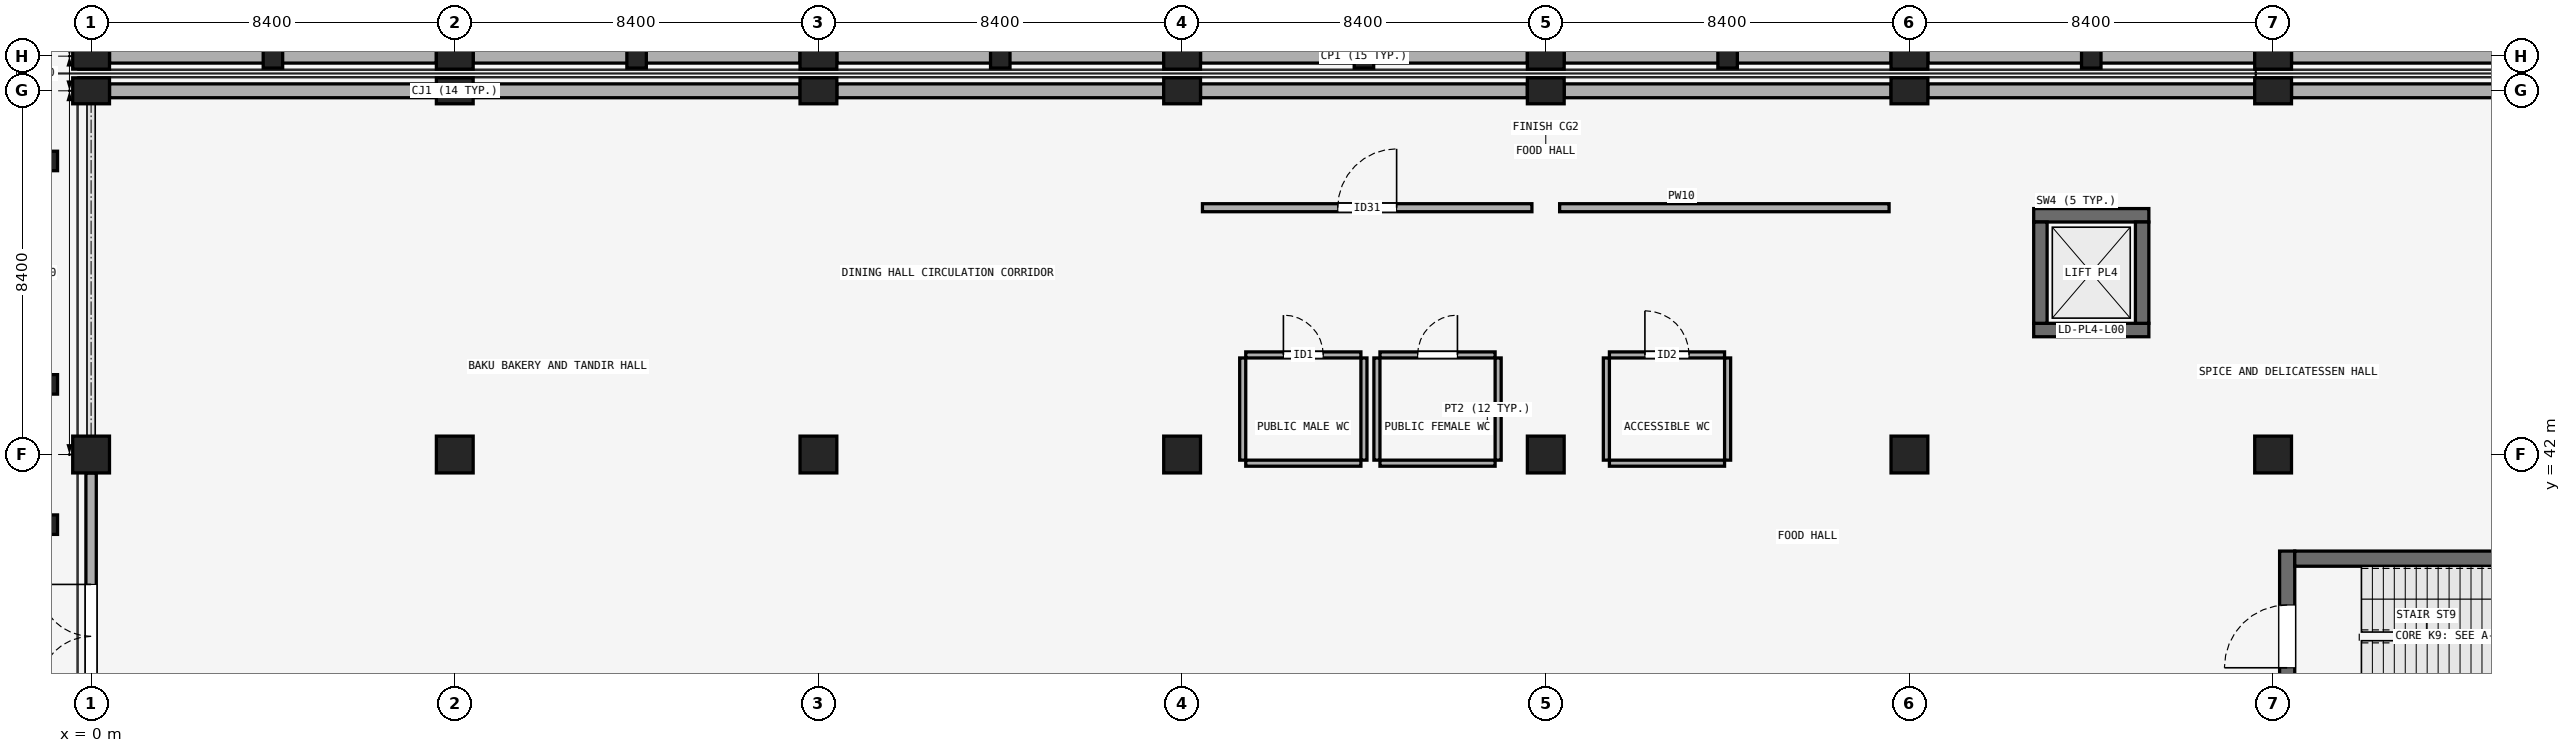
"""IFC4 building model, lengths in metres.
Left out: names, types, materials, properties, quantities, classifications, styles, units other than length and angle.
Written with IfcOpenShell. Run it as: python <this file> out.ifc"""

import sys

from ifc_helpers import new_model, si_unit, direction, frame, frame_2d, origin, origin_2d, place, context, subcontext, project, spatial, rectangle, extrude, element, fill, save


model = new_model("IFC4")
c1 = context("Model", 3, precision=1e-05, world=origin(), true_north=direction((0.0, 1.0)))
c2 = subcontext(c1, "Body", "Model", "MODEL_VIEW")
j1 = project(units=[si_unit("LENGTHUNIT", "METRE"), si_unit("PLANEANGLEUNIT", "RADIAN")], contexts=[c1])
p1 = place(None, origin())
s1 = spatial("IfcSite", under=j1, at=p1, CompositionType="ELEMENT")
p2 = place(p1, origin())
s2 = spatial("IfcBuilding", under=s1, at=p2, CompositionType="ELEMENT")
p3 = place(p2, origin())
s3 = spatial("IfcBuildingStorey", under=s2, at=p3, CompositionType="ELEMENT", Elevation=0.0)
for number, where, z_axis, x_axis in (
    (1, (0.0, 51.2, 0.0), (0.0, 0.0, 1.0), (0.0, 1.0, 0.0)),
    (2, (8.4, 51.2, 0.0), (0.0, 0.0, 1.0), (0.0, 1.0, 0.0)),
    (3, (16.8, 51.2, 0.0), (0.0, 0.0, 1.0), (0.0, 1.0, 0.0)),
    (4, (25.2, 51.2, 0.0), (0.0, 0.0, 1.0), (0.0, 1.0, 0.0)),
    (5, (33.6, 51.2, 0.0), (0.0, 0.0, 1.0), (0.0, 1.0, 0.0)),
    (6, (42.0, 51.2, 0.0), (0.0, 0.0, 1.0), (0.0, 1.0, 0.0)),
    (7, (50.4, 51.2, 0.0), (0.0, 0.0, 1.0), (0.0, 1.0, 0.0)),
):
    element("IfcColumn", number, at=place(p3, frame(where, z_axis=z_axis, x_axis=x_axis)), inside=s3, PredefinedType="COLUMN", context=c2, shape_type="SweptSolid", body=[
        extrude(rectangle(XDim=0.6, YDim=0.85, at=origin_2d()), origin(), (0.0, 0.0, 1.0), 5.4),
    ])
for number, where, z_axis, x_axis in (
    (8, (0.0, 42.0, 0.0), (0.0, 0.0, 1.0), (1.0, 0.0, 0.0)),
    (9, (8.4, 42.0, 0.0), (0.0, 0.0, 1.0), (1.0, 0.0, 0.0)),
    (10, (16.8, 42.0, 0.0), (0.0, 0.0, 1.0), (1.0, 0.0, 0.0)),
    (11, (25.2, 42.0, 0.0), (0.0, 0.0, 1.0), (1.0, 0.0, 0.0)),
    (12, (33.6, 42.0, 0.0), (0.0, 0.0, 1.0), (1.0, 0.0, 0.0)),
    (13, (42.0, 42.0, 0.0), (0.0, 0.0, 1.0), (1.0, 0.0, 0.0)),
    (14, (50.4, 42.0, 0.0), (0.0, 0.0, 1.0), (1.0, 0.0, 0.0)),
):
    element("IfcColumn", number, at=place(p3, frame(where, z_axis=z_axis, x_axis=x_axis)), inside=s3, PredefinedType="COLUMN", context=c2, shape_type="SweptSolid", body=[
        extrude(rectangle(XDim=0.85, YDim=0.85, at=origin_2d()), origin(), (0.0, 0.0, 1.0), 5.4),
    ])
for number, where, z_axis, x_axis in (
    (15, (0.0, 50.4, 0.0), (0.0, 0.0, 1.0), (0.0, 1.0, 0.0)),
    (16, (8.4, 50.4, 0.0), (0.0, 0.0, 1.0), (0.0, 1.0, 0.0)),
    (17, (16.8, 50.4, 0.0), (0.0, 0.0, 1.0), (0.0, 1.0, 0.0)),
    (18, (25.2, 50.4, 0.0), (0.0, 0.0, 1.0), (0.0, 1.0, 0.0)),
    (19, (33.6, 50.4, 0.0), (0.0, 0.0, 1.0), (0.0, 1.0, 0.0)),
    (20, (42.0, 50.4, 0.0), (0.0, 0.0, 1.0), (0.0, 1.0, 0.0)),
    (21, (50.4, 50.4, 0.0), (0.0, 0.0, 1.0), (0.0, 1.0, 0.0)),
):
    element("IfcColumn", number, at=place(p3, frame(where, z_axis=z_axis, x_axis=x_axis)), inside=s3, PredefinedType="COLUMN", context=c2, shape_type="SweptSolid", body=[
        extrude(rectangle(XDim=0.6, YDim=0.85, at=origin_2d()), origin(), (0.0, 0.0, 1.0), 5.4),
    ])
for number, where, z_axis, x_axis in (
    (22, (4.2, 51.2, 0.0), (0.0, 0.0, 1.0), (1.0, 0.0, 0.0)),
    (23, (12.6, 51.2, 0.0), (0.0, 0.0, 1.0), (1.0, 0.0, 0.0)),
    (24, (21.0, 51.2, 0.0), (0.0, 0.0, 1.0), (1.0, 0.0, 0.0)),
    (25, (29.4, 51.2, 0.0), (0.0, 0.0, 1.0), (1.0, 0.0, 0.0)),
    (26, (37.8, 51.2, 0.0), (0.0, 0.0, 1.0), (1.0, 0.0, 0.0)),
    (27, (46.2, 51.2, 0.0), (0.0, 0.0, 1.0), (1.0, 0.0, 0.0)),
    (28, (-1.05, 40.38, 0.0), (0.0, 0.0, 1.0), (0.0, 1.0, 0.0)),
    (29, (-1.05, 43.62, 0.0), (0.0, 0.0, 1.0), (0.0, 1.0, 0.0)),
    (30, (-1.05, 48.78, 0.0), (0.0, 0.0, 1.0), (0.0, 1.0, 0.0)),
):
    element("IfcColumn", number, at=place(p3, frame(where, z_axis=z_axis, x_axis=x_axis)), inside=s3, PredefinedType="PILASTER", context=c2, shape_type="SweptSolid", body=[
        extrude(rectangle(XDim=0.45, YDim=0.55, at=origin_2d()), origin(), (0.0, 0.0, 1.0), 5.4),
    ])
for number, where, z_axis, x_axis in (
    (31, (0.425, 51.2, 0.0), (0.0, 0.0, 1.0), (1.0, 0.0, 0.0)),
    (32, (8.825, 51.2, 0.0), (0.0, 0.0, 1.0), (1.0, 0.0, 0.0)),
):
    element("IfcWall", number, at=place(p3, frame(where, z_axis=z_axis, x_axis=x_axis)), inside=s3, PredefinedType="SOLIDWALL", context=c2, shape_type="SweptSolid", body=[
        extrude(rectangle(XDim=7.55, YDim=0.32, at=frame_2d((3.775, 0.0))), origin(), (0.0, 0.0, 1.0), 4.35),
    ])
p4 = place(p3, frame((17.225, 51.2, 0.0), z_axis=(0.0, 0.0, 1.0), x_axis=(1.0, 0.0, 0.0)))
e33 = element("IfcWall", 33, at=p4, inside=s3, PredefinedType="SOLIDWALL", context=c2, shape_type="SweptSolid", body=[
    extrude(rectangle(XDim=7.55, YDim=0.32, at=frame_2d((3.775, 0.0))), origin(), (0.0, 0.0, 1.0), 4.35),
])
for number, where, z_axis, x_axis in (
    (34, (25.625, 51.2, 0.0), (0.0, 0.0, 1.0), (1.0, 0.0, 0.0)),
    (35, (34.025, 51.2, 0.0), (0.0, 0.0, 1.0), (1.0, 0.0, 0.0)),
    (36, (42.425, 51.2, 0.0), (0.0, 0.0, 1.0), (1.0, 0.0, 0.0)),
    (37, (50.825, 51.2, 0.0), (0.0, 0.0, 1.0), (1.0, 0.0, 0.0)),
):
    element("IfcWall", number, at=place(p3, frame(where, z_axis=z_axis, x_axis=x_axis)), inside=s3, PredefinedType="SOLIDWALL", context=c2, shape_type="SweptSolid", body=[
        extrude(rectangle(XDim=7.55, YDim=0.32, at=frame_2d((3.775, 0.0))), origin(), (0.0, 0.0, 1.0), 4.35),
    ])
for number, where, z_axis, x_axis in (
    (38, (0.425, 50.4, 0.0), (0.0, 0.0, 1.0), (1.0, 0.0, 0.0)),
    (39, (8.825, 50.4, 0.0), (0.0, 0.0, 1.0), (1.0, 0.0, 0.0)),
):
    element("IfcWall", number, at=place(p3, frame(where, z_axis=z_axis, x_axis=x_axis)), inside=s3, PredefinedType="SOLIDWALL", context=c2, shape_type="SweptSolid", body=[
        extrude(rectangle(XDim=7.55, YDim=0.32, at=frame_2d((3.775, 0.0))), origin(), (0.0, 0.0, 1.0), 4.33),
    ])
p5 = place(p3, frame((17.225, 50.4, 0.0), z_axis=(0.0, 0.0, 1.0), x_axis=(1.0, 0.0, 0.0)))
e40 = element("IfcWall", 40, at=p5, inside=s3, PredefinedType="SOLIDWALL", context=c2, shape_type="SweptSolid", body=[
    extrude(rectangle(XDim=7.55, YDim=0.32, at=frame_2d((3.775, 0.0))), origin(), (0.0, 0.0, 1.0), 4.33),
])
for number, where, z_axis, x_axis in (
    (41, (25.625, 50.4, 0.0), (0.0, 0.0, 1.0), (1.0, 0.0, 0.0)),
    (42, (34.025, 50.4, 0.0), (0.0, 0.0, 1.0), (1.0, 0.0, 0.0)),
    (43, (42.425, 50.4, 0.0), (0.0, 0.0, 1.0), (1.0, 0.0, 0.0)),
    (44, (50.825, 50.4, 0.0), (0.0, 0.0, 1.0), (1.0, 0.0, 0.0)),
):
    element("IfcWall", number, at=place(p3, frame(where, z_axis=z_axis, x_axis=x_axis)), inside=s3, PredefinedType="SOLIDWALL", context=c2, shape_type="SweptSolid", body=[
        extrude(rectangle(XDim=7.55, YDim=0.32, at=frame_2d((3.775, 0.0))), origin(), (0.0, 0.0, 1.0), 4.33),
    ])
p6 = place(p3, frame((0.0, 34.025, 0.0), z_axis=(0.0, 0.0, 1.0), x_axis=(0.0, 1.0, 0.0)))
e45 = element("IfcWall", 45, at=p6, inside=s3, PredefinedType="SOLIDWALL", context=c2, shape_type="SweptSolid", body=[
    extrude(rectangle(XDim=7.55, YDim=0.24, at=frame_2d((3.775, 0.0))), origin(), (0.0, 0.0, 1.0), 4.33),
])
p7 = place(p6, frame((2.575, 0.0, 0.0)))
e46 = element("IfcOpeningElement", 46, at=p7, cuts=e45, PredefinedType="OPENING", context=c2, shape_type="SweptSolid", body=[
    extrude(rectangle(XDim=2.4, YDim=2.6, at=frame_2d((1.2, 1.3))), frame((0.0, 0.13, 0.0), z_axis=(0.0, -1.0, 0.0), x_axis=(1.0, 0.0, 0.0)), (0.0, 0.0, 1.0), 0.26),
])
p8 = place(p3, frame((50.725, 35.83, 0.0), z_axis=(0.0, 0.0, 1.0), x_axis=(0.0, 1.0, 0.0)))
e47 = element("IfcWall", 47, at=p8, inside=s3, PredefinedType="SHEAR", context=c2, shape_type="SweptSolid", body=[
    extrude(rectangle(XDim=3.94, YDim=0.35, at=frame_2d((1.97, 0.0))), origin(), (0.0, 0.0, 1.0), 5.08),
])
p9 = place(p8, frame((1.245, 0.0, 0.0)))
e48 = element("IfcOpeningElement", 48, at=p9, cuts=e47, PredefinedType="OPENING", context=c2, shape_type="SweptSolid", body=[
    extrude(rectangle(XDim=1.45, YDim=2.2, at=frame_2d((0.725, 1.1))), frame((0.0, 0.185, 0.0), z_axis=(0.0, -1.0, 0.0), x_axis=(1.0, 0.0, 0.0)), (0.0, 0.0, 1.0), 0.37),
])
p10 = place(p3, frame((50.9, 39.595, 0.0), z_axis=(0.0, 0.0, 1.0), x_axis=(1.0, 0.0, 0.0)))
e49 = element("IfcWall", 49, at=p10, inside=s3, PredefinedType="SHEAR", context=c2, shape_type="SweptSolid", body=[
    extrude(rectangle(XDim=7.4, YDim=0.35, at=frame_2d((3.7, 0.0))), origin(), (0.0, 0.0, 1.0), 5.08),
])
p11 = place(p3, frame((44.87, 44.875, 0.0), z_axis=(0.0, 0.0, 1.0), x_axis=(1.0, 0.0, 0.0)))
e50 = element("IfcWall", 50, at=p11, inside=s3, PredefinedType="SHEAR", context=c2, shape_type="SweptSolid", body=[
    extrude(rectangle(XDim=2.66, YDim=0.31, at=frame_2d((1.33, 0.0))), origin(), (0.0, 0.0, 1.0), 5.1),
])
p12 = place(p11, frame((0.78, 0.0, 0.0)))
e51 = element("IfcOpeningElement", 51, at=p12, cuts=e50, PredefinedType="OPENING", context=c2, shape_type="SweptSolid", body=[
    extrude(rectangle(XDim=1.1, YDim=2.2, at=frame_2d((0.55, 1.1))), frame((0.0, 0.165, 0.0), z_axis=(0.0, -1.0, 0.0), x_axis=(1.0, 0.0, 0.0)), (0.0, 0.0, 1.0), 0.33),
])
p13 = place(p3, frame((44.87, 47.525, 0.0), z_axis=(0.0, 0.0, 1.0), x_axis=(1.0, 0.0, 0.0)))
e52 = element("IfcWall", 52, at=p13, inside=s3, PredefinedType="SHEAR", context=c2, shape_type="SweptSolid", body=[
    extrude(rectangle(XDim=2.66, YDim=0.31, at=frame_2d((1.33, 0.0))), origin(), (0.0, 0.0, 1.0), 5.1),
])
for number, where, z_axis, x_axis in (
    (53, (45.025, 45.03, 0.0), (0.0, 0.0, 1.0), (0.0, 1.0, 0.0)),
    (54, (47.375, 45.03, 0.0), (0.0, 0.0, 1.0), (0.0, 1.0, 0.0)),
):
    element("IfcWall", number, at=place(p3, frame(where, z_axis=z_axis, x_axis=x_axis)), inside=s3, PredefinedType="SHEAR", context=c2, shape_type="SweptSolid", body=[
        extrude(rectangle(XDim=2.34, YDim=0.31, at=frame_2d((1.17, 0.0))), origin(), (0.0, 0.0, 1.0), 5.1),
    ])
p14 = place(p3, frame((26.67, 44.3, 0.0), z_axis=(0.0, 0.0, 1.0), x_axis=(1.0, 0.0, 0.0)))
e55 = element("IfcWall", 55, at=p14, inside=s3, PredefinedType="PARTITIONING", context=c2, shape_type="SweptSolid", body=[
    extrude(rectangle(XDim=2.66, YDim=0.14, at=frame_2d((1.33, 0.0))), origin(), (0.0, 0.0, 1.0), 5.1),
])
p15 = place(p14, frame((0.87, 0.0, 0.0)))
e56 = element("IfcOpeningElement", 56, at=p15, cuts=e55, PredefinedType="OPENING", context=c2, shape_type="SweptSolid", body=[
    extrude(rectangle(XDim=0.92, YDim=2.12, at=frame_2d((0.46, 1.06))), frame((0.0, 0.08, 0.0), z_axis=(0.0, -1.0, 0.0), x_axis=(1.0, 0.0, 0.0)), (0.0, 0.0, 1.0), 0.16),
])
p16 = place(p3, frame((26.67, 41.8, 0.0), z_axis=(0.0, 0.0, 1.0), x_axis=(1.0, 0.0, 0.0)))
e57 = element("IfcWall", 57, at=p16, inside=s3, PredefinedType="PARTITIONING", context=c2, shape_type="SweptSolid", body=[
    extrude(rectangle(XDim=2.66, YDim=0.14, at=frame_2d((1.33, 0.0))), origin(), (0.0, 0.0, 1.0), 4.38),
])
for number, where, z_axis, x_axis in (
    (58, (26.6, 41.87, 0.0), (0.0, 0.0, 1.0), (0.0, 1.0, 0.0)),
    (59, (29.4, 41.87, 0.0), (0.0, 0.0, 1.0), (0.0, 1.0, 0.0)),
):
    element("IfcWall", number, at=place(p3, frame(where, z_axis=z_axis, x_axis=x_axis)), inside=s3, PredefinedType="PARTITIONING", context=c2, shape_type="SweptSolid", body=[
        extrude(rectangle(XDim=2.36, YDim=0.14, at=frame_2d((1.18, 0.0))), origin(), (0.0, 0.0, 1.0), 4.38),
    ])
p17 = place(p3, frame((29.77, 44.3, 0.0), z_axis=(0.0, 0.0, 1.0), x_axis=(1.0, 0.0, 0.0)))
e60 = element("IfcWall", 60, at=p17, inside=s3, PredefinedType="PARTITIONING", context=c2, shape_type="SweptSolid", body=[
    extrude(rectangle(XDim=2.66, YDim=0.14, at=frame_2d((1.33, 0.0))), origin(), (0.0, 0.0, 1.0), 5.1),
])
p18 = place(p17, frame((0.87, 0.0, 0.0)))
e61 = element("IfcOpeningElement", 61, at=p18, cuts=e60, PredefinedType="OPENING", context=c2, shape_type="SweptSolid", body=[
    extrude(rectangle(XDim=0.92, YDim=2.12, at=frame_2d((0.46, 1.06))), frame((0.0, 0.08, 0.0), z_axis=(0.0, -1.0, 0.0), x_axis=(1.0, 0.0, 0.0)), (0.0, 0.0, 1.0), 0.16),
])
p19 = place(p3, frame((29.77, 41.8, 0.0), z_axis=(0.0, 0.0, 1.0), x_axis=(1.0, 0.0, 0.0)))
e62 = element("IfcWall", 62, at=p19, inside=s3, PredefinedType="PARTITIONING", context=c2, shape_type="SweptSolid", body=[
    extrude(rectangle(XDim=2.66, YDim=0.14, at=frame_2d((1.33, 0.0))), origin(), (0.0, 0.0, 1.0), 4.38),
])
for number, where, z_axis, x_axis in (
    (63, (29.7, 41.87, 0.0), (0.0, 0.0, 1.0), (0.0, 1.0, 0.0)),
    (64, (32.5, 41.87, 0.0), (0.0, 0.0, 1.0), (0.0, 1.0, 0.0)),
):
    element("IfcWall", number, at=place(p3, frame(where, z_axis=z_axis, x_axis=x_axis)), inside=s3, PredefinedType="PARTITIONING", context=c2, shape_type="SweptSolid", body=[
        extrude(rectangle(XDim=2.36, YDim=0.14, at=frame_2d((1.18, 0.0))), origin(), (0.0, 0.0, 1.0), 4.38),
    ])
p20 = place(p3, frame((35.07, 44.3, 0.0), z_axis=(0.0, 0.0, 1.0), x_axis=(1.0, 0.0, 0.0)))
e65 = element("IfcWall", 65, at=p20, inside=s3, PredefinedType="PARTITIONING", context=c2, shape_type="SweptSolid", body=[
    extrude(rectangle(XDim=2.66, YDim=0.14, at=frame_2d((1.33, 0.0))), origin(), (0.0, 0.0, 1.0), 5.1),
])
p21 = place(p20, frame((0.82, 0.0, 0.0)))
e66 = element("IfcOpeningElement", 66, at=p21, cuts=e65, PredefinedType="OPENING", context=c2, shape_type="SweptSolid", body=[
    extrude(rectangle(XDim=1.02, YDim=2.15, at=frame_2d((0.51, 1.075))), frame((0.0, 0.08, 0.0), z_axis=(0.0, -1.0, 0.0), x_axis=(1.0, 0.0, 0.0)), (0.0, 0.0, 1.0), 0.16),
])
p22 = place(p3, frame((35.07, 41.8, 0.0), z_axis=(0.0, 0.0, 1.0), x_axis=(1.0, 0.0, 0.0)))
e67 = element("IfcWall", 67, at=p22, inside=s3, PredefinedType="PARTITIONING", context=c2, shape_type="SweptSolid", body=[
    extrude(rectangle(XDim=2.66, YDim=0.14, at=frame_2d((1.33, 0.0))), origin(), (0.0, 0.0, 1.0), 4.38),
])
for number, where, z_axis, x_axis in (
    (68, (35.0, 41.87, 0.0), (0.0, 0.0, 1.0), (0.0, 1.0, 0.0)),
    (69, (37.8, 41.87, 0.0), (0.0, 0.0, 1.0), (0.0, 1.0, 0.0)),
):
    element("IfcWall", number, at=place(p3, frame(where, z_axis=z_axis, x_axis=x_axis)), inside=s3, PredefinedType="PARTITIONING", context=c2, shape_type="SweptSolid", body=[
        extrude(rectangle(XDim=2.36, YDim=0.14, at=frame_2d((1.18, 0.0))), origin(), (0.0, 0.0, 1.0), 4.38),
    ])
p23 = place(p3, frame((25.67, 47.7, 0.0), z_axis=(0.0, 0.0, 1.0), x_axis=(1.0, 0.0, 0.0)))
e70 = element("IfcWall", 70, at=p23, inside=s3, PredefinedType="PARTITIONING", context=c2, shape_type="SweptSolid", body=[
    extrude(rectangle(XDim=7.61, YDim=0.185, at=frame_2d((3.805, 0.0))), origin(), (0.0, 0.0, 1.0), 4.33),
])
p24 = place(p23, frame((3.125, 0.0, 0.0)))
e71 = element("IfcOpeningElement", 71, at=p24, cuts=e70, PredefinedType="OPENING", context=c2, shape_type="SweptSolid", body=[
    extrude(rectangle(XDim=1.36, YDim=2.1, at=frame_2d((0.68, 1.05))), frame((0.0, 0.103, 0.0), z_axis=(0.0, -1.0, 0.0), x_axis=(1.0, 0.0, 0.0)), (0.0, 0.0, 1.0), 0.205),
])
p25 = place(p3, frame((33.92, 47.7, 0.0), z_axis=(0.0, 0.0, 1.0), x_axis=(1.0, 0.0, 0.0)))
e72 = element("IfcWall", 72, at=p25, inside=s3, PredefinedType="PARTITIONING", context=c2, shape_type="SweptSolid", body=[
    extrude(rectangle(XDim=7.61, YDim=0.185, at=frame_2d((3.805, 0.0))), origin(), (0.0, 0.0, 1.0), 4.33),
])
p26 = place(p7, origin())
e73 = element("IfcDoor", 73, at=p26, inside=s3, OperationType="DOUBLE_DOOR_SINGLE_SWING", PredefinedType="DOOR", context=c2, shape_type="SweptSolid", body=[
    extrude(rectangle(XDim=2.4, YDim=2.6, at=frame_2d((1.2, 1.3))), frame((0.0, 0.025, 0.0), z_axis=(0.0, -1.0, 0.0), x_axis=(1.0, 0.0, 0.0)), (0.0, 0.0, 1.0), 0.05),
])
fill(e46, e73)
p27 = place(p9, origin())
e74 = element("IfcDoor", 74, at=p27, inside=s3, OperationType="SINGLE_SWING_LEFT", PredefinedType="DOOR", context=c2, shape_type="SweptSolid", body=[
    extrude(rectangle(XDim=1.45, YDim=2.2, at=frame_2d((0.725, 1.1))), frame((0.0, 0.025, 0.0), z_axis=(0.0, -1.0, 0.0), x_axis=(1.0, 0.0, 0.0)), (0.0, 0.0, 1.0), 0.05),
])
fill(e48, e74)
p28 = place(p12, origin())
e75 = element("IfcDoor", 75, at=p28, inside=s3, OperationType="SLIDING_TO_LEFT", PredefinedType="DOOR", context=c2, shape_type="SweptSolid", body=[
    extrude(rectangle(XDim=1.1, YDim=2.2, at=frame_2d((0.55, 1.1))), frame((0.0, 0.025, 0.0), z_axis=(0.0, -1.0, 0.0), x_axis=(1.0, 0.0, 0.0)), (0.0, 0.0, 1.0), 0.05),
])
fill(e51, e75)
p29 = place(p15, origin())
e76 = element("IfcDoor", 76, at=p29, inside=s3, OperationType="SINGLE_SWING_LEFT", PredefinedType="DOOR", context=c2, shape_type="SweptSolid", body=[
    extrude(rectangle(XDim=0.92, YDim=2.12, at=frame_2d((0.46, 1.06))), frame((0.0, 0.025, 0.0), z_axis=(0.0, -1.0, 0.0), x_axis=(1.0, 0.0, 0.0)), (0.0, 0.0, 1.0), 0.05),
])
fill(e56, e76)
p30 = place(p18, origin())
e77 = element("IfcDoor", 77, at=p30, inside=s3, OperationType="SINGLE_SWING_RIGHT", PredefinedType="DOOR", context=c2, shape_type="SweptSolid", body=[
    extrude(rectangle(XDim=0.92, YDim=2.12, at=frame_2d((0.46, 1.06))), frame((0.0, 0.025, 0.0), z_axis=(0.0, -1.0, 0.0), x_axis=(1.0, 0.0, 0.0)), (0.0, 0.0, 1.0), 0.05),
])
fill(e61, e77)
p31 = place(p21, origin())
e78 = element("IfcDoor", 78, at=p31, inside=s3, OperationType="SINGLE_SWING_LEFT", PredefinedType="DOOR", context=c2, shape_type="SweptSolid", body=[
    extrude(rectangle(XDim=1.02, YDim=2.15, at=frame_2d((0.51, 1.075))), frame((0.0, 0.025, 0.0), z_axis=(0.0, -1.0, 0.0), x_axis=(1.0, 0.0, 0.0)), (0.0, 0.0, 1.0), 0.05),
])
fill(e66, e78)
p32 = place(p24, origin())
e79 = element("IfcDoor", 79, at=p32, inside=s3, OperationType="SINGLE_SWING_RIGHT", PredefinedType="DOOR", context=c2, shape_type="SweptSolid", body=[
    extrude(rectangle(XDim=1.36, YDim=2.1, at=frame_2d((0.68, 1.05))), frame((0.0, 0.025, 0.0), z_axis=(0.0, -1.0, 0.0), x_axis=(1.0, 0.0, 0.0)), (0.0, 0.0, 1.0), 0.05),
])
fill(e71, e79)
save(model, sys.argv[1])
